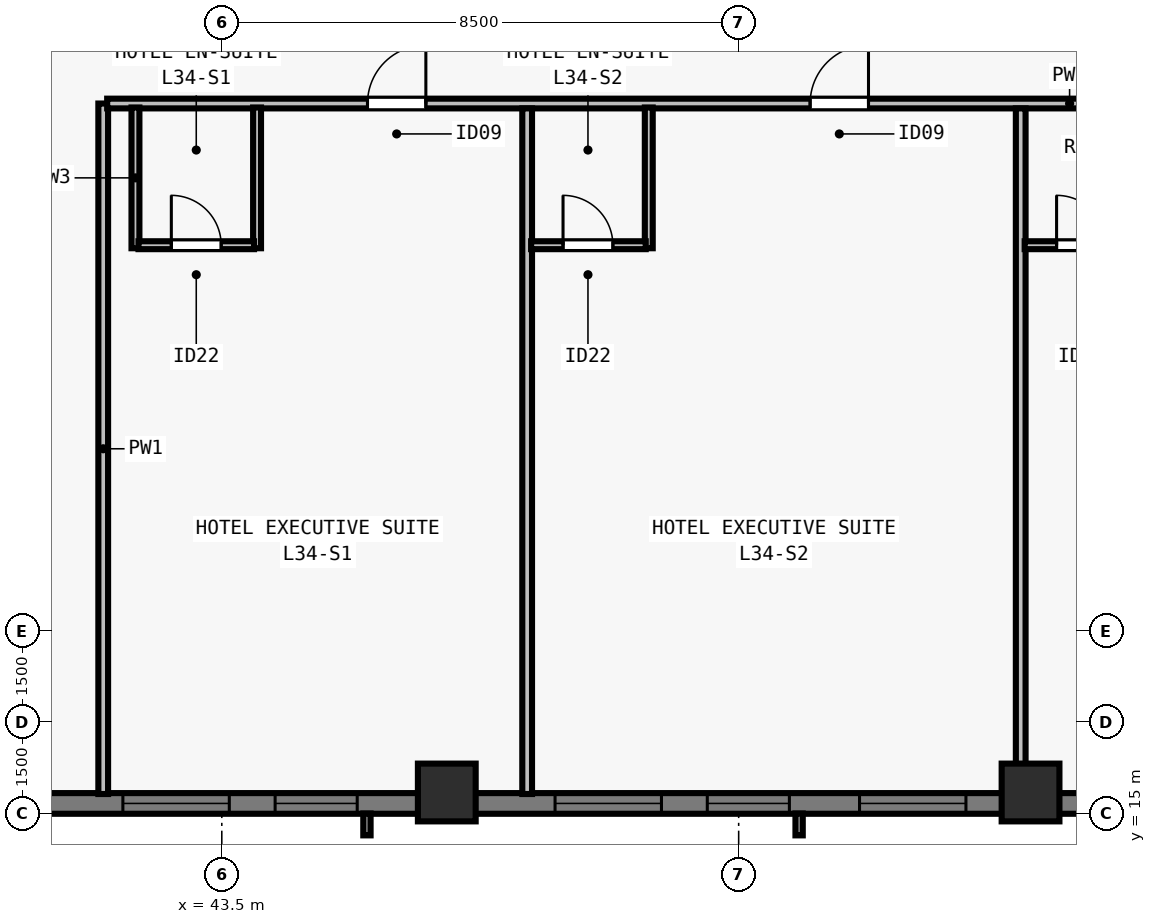
"""IFC4 building model, lengths in metres.
Left out: names, types, materials, properties, quantities, classifications, styles, units other than length and angle.
Written with IfcOpenShell. Run it as: python <this file> out.ifc"""

import sys

from ifc_helpers import new_model, si_unit, direction, frame, frame_2d, origin, origin_2d, place, context, subcontext, project, spatial, rectangle, extrude, element, fill, save


model = new_model("IFC4")
c1 = context("Model", 3, precision=1e-05, world=origin(), true_north=direction((0.0, 1.0)))
c2 = subcontext(c1, "Body", "Model", "MODEL_VIEW")
j1 = project(units=[si_unit("LENGTHUNIT", "METRE"), si_unit("PLANEANGLEUNIT", "RADIAN")], contexts=[c1])
p1 = place(None, origin())
s1 = spatial("IfcSite", under=j1, at=p1, CompositionType="ELEMENT")
p2 = place(p1, origin())
s2 = spatial("IfcBuilding", under=s1, at=p2, CompositionType="ELEMENT")
p3 = place(p2, frame((0.0, 0.0, 127.0)))
s3 = spatial("IfcBuildingStorey", under=s2, at=p3, CompositionType="ELEMENT", Elevation=127.0)
for number, where, z_axis, x_axis in (
    (1, (47.2, 15.35, 0.0), (0.0, 0.0, 1.0), (1.0, 0.0, 0.0)),
    (2, (56.8, 15.35, 0.0), (0.0, 0.0, 1.0), (1.0, 0.0, 0.0)),
):
    element("IfcColumn", number, at=place(p3, frame(where, z_axis=z_axis, x_axis=x_axis)), inside=s3, PredefinedType="COLUMN", context=c2, shape_type="SweptSolid", body=[
        extrude(rectangle(XDim=0.95, YDim=0.95, at=origin_2d()), origin(), (0.0, 0.0, 1.0), 3.5),
    ])
p4 = place(p3, frame((72.0, 15.17, 0.0), z_axis=(0.0, 0.0, 1.0), x_axis=(-1.0, 0.0, 0.0)))
e3 = element("IfcWall", 3, at=p4, inside=s3, PredefinedType="SOLIDWALL", context=c2, shape_type="SweptSolid", body=[
    extrude(rectangle(XDim=39.682, YDim=0.34, at=frame_2d((19.841, 0.0))), origin(), (0.0, 0.0, 1.0), 3.28),
])
p5 = place(p4, frame((8.755, 0.0, 0.8)))
e4 = element("IfcOpeningElement", 4, at=p5, cuts=e3, PredefinedType="OPENING", context=c2, shape_type="SweptSolid", body=[
    extrude(rectangle(XDim=1.75, YDim=1.66, at=frame_2d((0.875, 0.83))), frame((0.0, 0.18, 0.0), z_axis=(0.0, -1.0, 0.0), x_axis=(1.0, 0.0, 0.0)), (0.0, 0.0, 1.0), 0.36),
])
p6 = place(p4, frame((12.059, 0.0, 0.8)))
e5 = element("IfcOpeningElement", 5, at=p6, cuts=e3, PredefinedType="OPENING", context=c2, shape_type="SweptSolid", body=[
    extrude(rectangle(XDim=1.35, YDim=1.66, at=frame_2d((0.675, 0.83))), frame((0.0, 0.18, 0.0), z_axis=(0.0, -1.0, 0.0), x_axis=(1.0, 0.0, 0.0)), (0.0, 0.0, 1.0), 0.36),
])
p7 = place(p4, frame((16.262, 0.0, 0.8)))
e6 = element("IfcOpeningElement", 6, at=p7, cuts=e3, PredefinedType="OPENING", context=c2, shape_type="SweptSolid", body=[
    extrude(rectangle(XDim=1.75, YDim=1.66, at=frame_2d((0.875, 0.83))), frame((0.0, 0.18, 0.0), z_axis=(0.0, -1.0, 0.0), x_axis=(1.0, 0.0, 0.0)), (0.0, 0.0, 1.0), 0.36),
])
p8 = place(p4, frame((19.166, 0.0, 0.8)))
e7 = element("IfcOpeningElement", 7, at=p8, cuts=e3, PredefinedType="OPENING", context=c2, shape_type="SweptSolid", body=[
    extrude(rectangle(XDim=1.35, YDim=1.66, at=frame_2d((0.675, 0.83))), frame((0.0, 0.18, 0.0), z_axis=(0.0, -1.0, 0.0), x_axis=(1.0, 0.0, 0.0)), (0.0, 0.0, 1.0), 0.36),
])
p9 = place(p4, frame((21.27, 0.0, 0.8)))
e8 = element("IfcOpeningElement", 8, at=p9, cuts=e3, PredefinedType="OPENING", context=c2, shape_type="SweptSolid", body=[
    extrude(rectangle(XDim=1.75, YDim=1.66, at=frame_2d((0.875, 0.83))), frame((0.0, 0.18, 0.0), z_axis=(0.0, -1.0, 0.0), x_axis=(1.0, 0.0, 0.0)), (0.0, 0.0, 1.0), 0.36),
])
p10 = place(p4, frame((26.273, 0.0, 0.8)))
e9 = element("IfcOpeningElement", 9, at=p10, cuts=e3, PredefinedType="OPENING", context=c2, shape_type="SweptSolid", body=[
    extrude(rectangle(XDim=1.35, YDim=1.66, at=frame_2d((0.675, 0.83))), frame((0.0, 0.18, 0.0), z_axis=(0.0, -1.0, 0.0), x_axis=(1.0, 0.0, 0.0)), (0.0, 0.0, 1.0), 0.36),
])
p11 = place(p4, frame((28.377, 0.0, 0.8)))
e10 = element("IfcOpeningElement", 10, at=p11, cuts=e3, PredefinedType="OPENING", context=c2, shape_type="SweptSolid", body=[
    extrude(rectangle(XDim=1.75, YDim=1.66, at=frame_2d((0.875, 0.83))), frame((0.0, 0.18, 0.0), z_axis=(0.0, -1.0, 0.0), x_axis=(1.0, 0.0, 0.0)), (0.0, 0.0, 1.0), 0.36),
])
p12 = place(p4, frame((32.93, 0.0, 0.8)))
e11 = element("IfcOpeningElement", 11, at=p12, cuts=e3, PredefinedType="OPENING", context=c2, shape_type="SweptSolid", body=[
    extrude(rectangle(XDim=1.35, YDim=1.66, at=frame_2d((0.675, 0.83))), frame((0.0, 0.18, 0.0), z_axis=(0.0, -1.0, 0.0), x_axis=(1.0, 0.0, 0.0)), (0.0, 0.0, 1.0), 0.36),
])
p13 = place(p3, frame((41.55, 15.325, 0.0), z_axis=(0.0, 0.0, 1.0), x_axis=(0.0, 1.0, 0.0)))
e12 = element("IfcWall", 12, at=p13, inside=s3, PredefinedType="PARTITIONING", context=c2, shape_type="SweptSolid", body=[
    extrude(rectangle(XDim=11.355, YDim=0.16, at=frame_2d((5.677, 0.0))), origin(), (0.0, 0.0, 1.0), 3.28),
])
p14 = place(p3, frame((41.615, 26.68, 0.0), z_axis=(0.0, 0.0, 1.0), x_axis=(1.0, 0.0, 0.0)))
e13 = element("IfcWall", 13, at=p14, inside=s3, PredefinedType="PARTITIONING", context=c2, shape_type="SweptSolid", body=[
    extrude(rectangle(XDim=22.07, YDim=0.16, at=frame_2d((11.035, 0.0))), origin(), (0.0, 0.0, 1.0), 3.28),
])
p15 = place(p14, frame((4.281, 0.0, 0.0)))
e14 = element("IfcOpeningElement", 14, at=p15, cuts=e13, PredefinedType="OPENING", context=c2, shape_type="SweptSolid", body=[
    extrude(rectangle(XDim=0.96, YDim=2.15, at=frame_2d((0.48, 1.075))), frame((0.0, 0.09, 0.0), z_axis=(0.0, -1.0, 0.0), x_axis=(1.0, 0.0, 0.0)), (0.0, 0.0, 1.0), 0.18),
])
p16 = place(p14, frame((11.56, 0.0, 0.0)))
e15 = element("IfcOpeningElement", 15, at=p16, cuts=e13, PredefinedType="OPENING", context=c2, shape_type="SweptSolid", body=[
    extrude(rectangle(XDim=0.96, YDim=2.15, at=frame_2d((0.48, 1.075))), frame((0.0, 0.09, 0.0), z_axis=(0.0, -1.0, 0.0), x_axis=(1.0, 0.0, 0.0)), (0.0, 0.0, 1.0), 0.18),
])
p17 = place(p14, frame((19.134, 0.0, 0.0)))
e16 = element("IfcOpeningElement", 16, at=p17, cuts=e13, PredefinedType="OPENING", context=c2, shape_type="SweptSolid", body=[
    extrude(rectangle(XDim=0.96, YDim=2.15, at=frame_2d((0.48, 1.075))), frame((0.0, 0.09, 0.0), z_axis=(0.0, -1.0, 0.0), x_axis=(1.0, 0.0, 0.0)), (0.0, 0.0, 1.0), 0.18),
])
for number, where, z_axis, x_axis in (
    (17, (42.08, 24.3, 0.0), (0.0, 0.0, 1.0), (0.0, 1.0, 0.0)),
    (18, (44.08, 24.3, 0.0), (0.0, 0.0, 1.0), (0.0, 1.0, 0.0)),
):
    element("IfcWall", number, at=place(p3, frame(where, z_axis=z_axis, x_axis=x_axis)), inside=s3, PredefinedType="PLUMBINGWALL", context=c2, shape_type="SweptSolid", body=[
        extrude(rectangle(XDim=2.315, YDim=0.13, at=frame_2d((1.157, 0.0))), origin(), (0.0, 0.0, 1.0), 3.28),
    ])
p18 = place(p3, frame((42.13, 24.35, 0.0), z_axis=(0.0, 0.0, 1.0), x_axis=(1.0, 0.0, 0.0)))
e19 = element("IfcWall", 19, at=p18, inside=s3, PredefinedType="PLUMBINGWALL", context=c2, shape_type="SweptSolid", body=[
    extrude(rectangle(XDim=1.9, YDim=0.13, at=frame_2d((0.95, 0.0))), origin(), (0.0, 0.0, 1.0), 3.28),
])
p19 = place(p18, frame((0.54, 0.0, 0.0)))
e20 = element("IfcOpeningElement", 20, at=p19, cuts=e19, PredefinedType="OPENING", context=c2, shape_type="SweptSolid", body=[
    extrude(rectangle(XDim=0.82, YDim=2.1, at=frame_2d((0.41, 1.05))), frame((0.0, 0.075, 0.0), z_axis=(0.0, -1.0, 0.0), x_axis=(1.0, 0.0, 0.0)), (0.0, 0.0, 1.0), 0.15),
])
p20 = place(p3, frame((48.522, 15.325, 0.0), z_axis=(0.0, 0.0, 1.0), x_axis=(0.0, 1.0, 0.0)))
e21 = element("IfcWall", 21, at=p20, inside=s3, PredefinedType="PARTITIONING", context=c2, shape_type="SweptSolid", body=[
    extrude(rectangle(XDim=11.275, YDim=0.16, at=frame_2d((5.638, 0.0))), origin(), (0.0, 0.0, 1.0), 2.896),
])
p21 = place(p3, frame((50.522, 24.3, 0.0), z_axis=(0.0, 0.0, 1.0), x_axis=(0.0, 1.0, 0.0)))
e22 = element("IfcWall", 22, at=p21, inside=s3, PredefinedType="PLUMBINGWALL", context=c2, shape_type="SweptSolid", body=[
    extrude(rectangle(XDim=2.315, YDim=0.13, at=frame_2d((1.157, 0.0))), origin(), (0.0, 0.0, 1.0), 3.28),
])
p22 = place(p3, frame((48.587, 24.35, 0.0), z_axis=(0.0, 0.0, 1.0), x_axis=(1.0, 0.0, 0.0)))
e23 = element("IfcWall", 23, at=p22, inside=s3, PredefinedType="PLUMBINGWALL", context=c2, shape_type="SweptSolid", body=[
    extrude(rectangle(XDim=1.885, YDim=0.13, at=frame_2d((0.942, 0.0))), origin(), (0.0, 0.0, 1.0), 3.28),
])
p23 = place(p22, frame((0.525, 0.0, 0.0)))
e24 = element("IfcOpeningElement", 24, at=p23, cuts=e23, PredefinedType="OPENING", context=c2, shape_type="SweptSolid", body=[
    extrude(rectangle(XDim=0.82, YDim=2.1, at=frame_2d((0.41, 1.05))), frame((0.0, 0.075, 0.0), z_axis=(0.0, -1.0, 0.0), x_axis=(1.0, 0.0, 0.0)), (0.0, 0.0, 1.0), 0.15),
])
p24 = place(p3, frame((56.638, 15.325, 0.0), z_axis=(0.0, 0.0, 1.0), x_axis=(0.0, 1.0, 0.0)))
e25 = element("IfcWall", 25, at=p24, inside=s3, PredefinedType="PARTITIONING", context=c2, shape_type="SweptSolid", body=[
    extrude(rectangle(XDim=11.275, YDim=0.16, at=frame_2d((5.638, 0.0))), origin(), (0.0, 0.0, 1.0), 2.555),
])
p25 = place(p3, frame((56.703, 24.35, 0.0), z_axis=(0.0, 0.0, 1.0), x_axis=(1.0, 0.0, 0.0)))
e26 = element("IfcWall", 26, at=p25, inside=s3, PredefinedType="PLUMBINGWALL", context=c2, shape_type="SweptSolid", body=[
    extrude(rectangle(XDim=1.885, YDim=0.13, at=frame_2d((0.942, 0.0))), origin(), (0.0, 0.0, 1.0), 3.28),
])
p26 = place(p25, frame((0.525, 0.0, 0.0)))
e27 = element("IfcOpeningElement", 27, at=p26, cuts=e26, PredefinedType="OPENING", context=c2, shape_type="SweptSolid", body=[
    extrude(rectangle(XDim=0.82, YDim=2.1, at=frame_2d((0.41, 1.05))), frame((0.0, 0.075, 0.0), z_axis=(0.0, -1.0, 0.0), x_axis=(1.0, 0.0, 0.0)), (0.0, 0.0, 1.0), 0.15),
])
p27 = place(p7, origin())
e28 = element("IfcWindow", 28, at=p27, inside=s3, PartitioningType="SINGLE_PANEL", PredefinedType="WINDOW", context=c2, shape_type="SweptSolid", body=[
    extrude(rectangle(XDim=1.75, YDim=1.66, at=frame_2d((0.875, 0.83))), frame((0.0, -0.05, 0.0), z_axis=(0.0, -1.0, 0.0), x_axis=(1.0, 0.0, 0.0)), (0.0, 0.0, 1.0), 0.06),
])
fill(e6, e28)
p28 = place(p8, origin())
e29 = element("IfcWindow", 29, at=p28, inside=s3, PartitioningType="SINGLE_PANEL", PredefinedType="WINDOW", context=c2, shape_type="SweptSolid", body=[
    extrude(rectangle(XDim=1.35, YDim=1.66, at=frame_2d((0.675, 0.83))), frame((0.0, -0.05, 0.0), z_axis=(0.0, -1.0, 0.0), x_axis=(1.0, 0.0, 0.0)), (0.0, 0.0, 1.0), 0.06),
])
fill(e7, e29)
p29 = place(p9, origin())
e30 = element("IfcWindow", 30, at=p29, inside=s3, PartitioningType="SINGLE_PANEL", PredefinedType="WINDOW", context=c2, shape_type="SweptSolid", body=[
    extrude(rectangle(XDim=1.75, YDim=1.66, at=frame_2d((0.875, 0.83))), frame((0.0, -0.05, 0.0), z_axis=(0.0, -1.0, 0.0), x_axis=(1.0, 0.0, 0.0)), (0.0, 0.0, 1.0), 0.06),
])
fill(e8, e30)
p30 = place(p10, origin())
e31 = element("IfcWindow", 31, at=p30, inside=s3, PartitioningType="SINGLE_PANEL", PredefinedType="WINDOW", context=c2, shape_type="SweptSolid", body=[
    extrude(rectangle(XDim=1.35, YDim=1.66, at=frame_2d((0.675, 0.83))), frame((0.0, -0.05, 0.0), z_axis=(0.0, -1.0, 0.0), x_axis=(1.0, 0.0, 0.0)), (0.0, 0.0, 1.0), 0.06),
])
fill(e9, e31)
p31 = place(p11, origin())
e32 = element("IfcWindow", 32, at=p31, inside=s3, PartitioningType="SINGLE_PANEL", PredefinedType="WINDOW", context=c2, shape_type="SweptSolid", body=[
    extrude(rectangle(XDim=1.75, YDim=1.66, at=frame_2d((0.875, 0.83))), frame((0.0, -0.05, 0.0), z_axis=(0.0, -1.0, 0.0), x_axis=(1.0, 0.0, 0.0)), (0.0, 0.0, 1.0), 0.06),
])
fill(e10, e32)
p32 = place(p19, origin())
e33 = element("IfcDoor", 33, at=p32, inside=s3, OperationType="SINGLE_SWING_LEFT", PredefinedType="DOOR", context=c2, shape_type="SweptSolid", body=[
    extrude(rectangle(XDim=0.82, YDim=2.1, at=frame_2d((0.41, 1.05))), frame((0.0, 0.025, 0.0), z_axis=(0.0, -1.0, 0.0), x_axis=(1.0, 0.0, 0.0)), (0.0, 0.0, 1.0), 0.05),
])
fill(e20, e33)
p33 = place(p15, origin())
e34 = element("IfcDoor", 34, at=p33, inside=s3, OperationType="SINGLE_SWING_RIGHT", PredefinedType="DOOR", context=c2, shape_type="SweptSolid", body=[
    extrude(rectangle(XDim=0.96, YDim=2.15, at=frame_2d((0.48, 1.075))), frame((0.0, 0.025, 0.0), z_axis=(0.0, -1.0, 0.0), x_axis=(1.0, 0.0, 0.0)), (0.0, 0.0, 1.0), 0.05),
])
fill(e14, e34)
p34 = place(p23, origin())
e35 = element("IfcDoor", 35, at=p34, inside=s3, OperationType="SINGLE_SWING_LEFT", PredefinedType="DOOR", context=c2, shape_type="SweptSolid", body=[
    extrude(rectangle(XDim=0.82, YDim=2.1, at=frame_2d((0.41, 1.05))), frame((0.0, 0.025, 0.0), z_axis=(0.0, -1.0, 0.0), x_axis=(1.0, 0.0, 0.0)), (0.0, 0.0, 1.0), 0.05),
])
fill(e24, e35)
p35 = place(p16, origin())
e36 = element("IfcDoor", 36, at=p35, inside=s3, OperationType="SINGLE_SWING_RIGHT", PredefinedType="DOOR", context=c2, shape_type="SweptSolid", body=[
    extrude(rectangle(XDim=0.96, YDim=2.15, at=frame_2d((0.48, 1.075))), frame((0.0, 0.025, 0.0), z_axis=(0.0, -1.0, 0.0), x_axis=(1.0, 0.0, 0.0)), (0.0, 0.0, 1.0), 0.05),
])
fill(e15, e36)
p36 = place(p26, origin())
e37 = element("IfcDoor", 37, at=p36, inside=s3, OperationType="SINGLE_SWING_LEFT", PredefinedType="DOOR", context=c2, shape_type="SweptSolid", body=[
    extrude(rectangle(XDim=0.82, YDim=2.1, at=frame_2d((0.41, 1.05))), frame((0.0, 0.025, 0.0), z_axis=(0.0, -1.0, 0.0), x_axis=(1.0, 0.0, 0.0)), (0.0, 0.0, 1.0), 0.05),
])
fill(e27, e37)
save(model, sys.argv[1])
